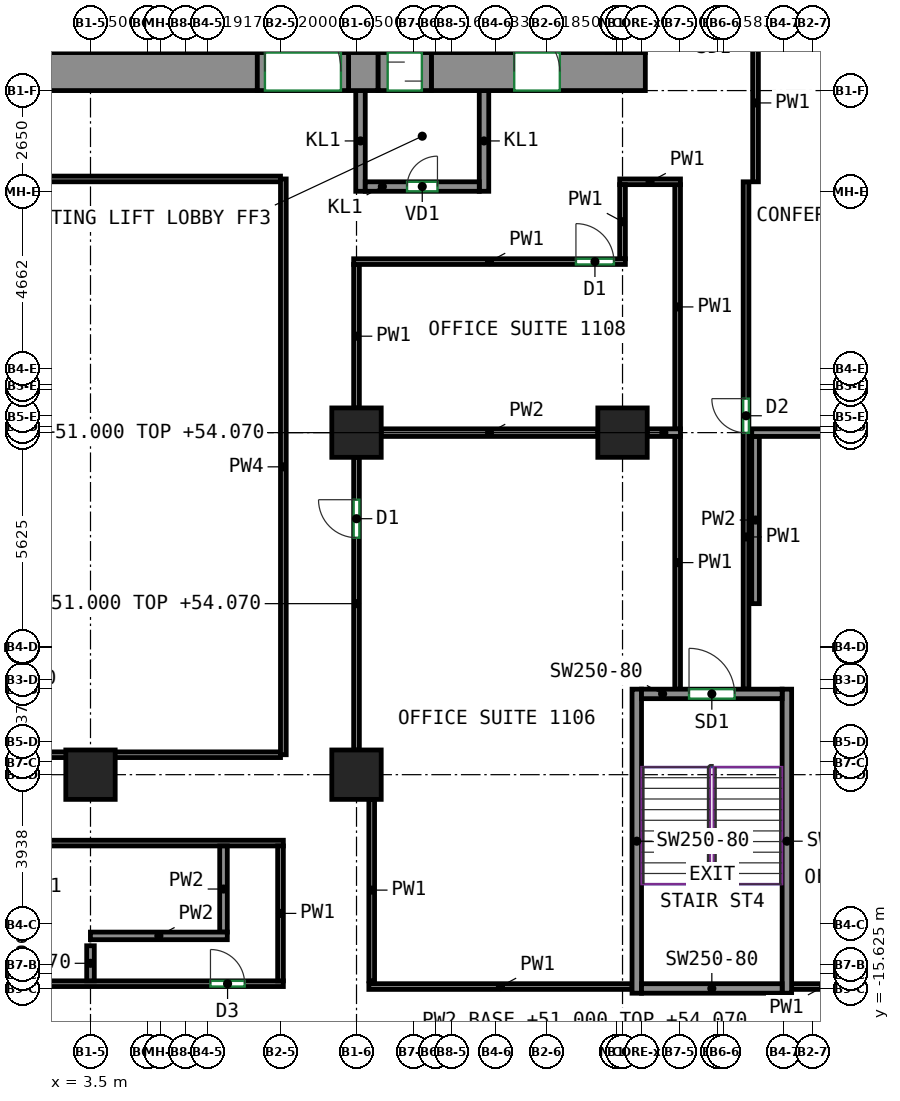
"""IFC4 building model, lengths in metres.
Left out: names, types, materials, properties, quantities, classifications, styles, units other than length and angle.
Written with IfcOpenShell. Run it as: python <this file> out.ifc"""

import sys

from ifc_helpers import new_model, si_unit, direction, frame, frame_2d, origin, origin_2d, place, context, subcontext, project, spatial, rectangle, extrude, source, transform, mapped, element, fill, save


model = new_model("IFC4")
c1 = context("Model", 3, precision=1e-05, world=origin(), true_north=direction((0.0, 1.0)))
c2 = subcontext(c1, "Body", "Model", "MODEL_VIEW")
j1 = project(units=[si_unit("LENGTHUNIT", "METRE"), si_unit("PLANEANGLEUNIT", "RADIAN")], contexts=[c1])
p1 = place(None, origin())
s1 = spatial("IfcSite", under=j1, at=p1, CompositionType="ELEMENT")
p2 = place(p1, origin())
s2 = spatial("IfcBuilding", under=s1, at=p2, CompositionType="ELEMENT")
p3 = place(p2, frame((0.0, 0.0, 51.0)))
s3 = spatial("IfcBuildingStorey", under=s2, at=p3, CompositionType="ELEMENT", Elevation=51.0)
m1 = source(origin(), c2, "Body", "SweptSolid", [
    extrude(rectangle(XDim=1.3, YDim=1.3, at=origin_2d()), origin(), (0.0, 0.0, 1.0), 3.72),
])
for number, where, z_axis, x_axis in (
    (1, (3.5, -10.0, 0.0), (0.0, 0.0, 1.0), (1.0, 0.0, 0.0)),
    (2, (10.5, -10.0, 0.0), (0.0, 0.0, 1.0), (1.0, 0.0, 0.0)),
    (3, (10.5, -1.0, 0.0), (0.0, 0.0, 1.0), (1.0, 0.0, 0.0)),
    (4, (17.5, -1.0, 0.0), (0.0, 0.0, 1.0), (1.0, 0.0, 0.0)),
):
    element("IfcColumn", number, at=place(p3, frame(where, z_axis=z_axis, x_axis=x_axis)), inside=s3, PredefinedType="COLUMN", context=c2, shape_type="MappedRepresentation", body=[
        mapped(m1, transform((0.0, 0.0, 0.0))),
    ])
m2 = source(origin(), c2, "Body", "SweptSolid", [
    extrude(rectangle(XDim=14.18, YDim=1.0, at=frame_2d((7.09, 0.0))), origin(), (0.0, 0.0, 1.0), 3.72),
])
p4 = place(p3, frame((-6.29, 8.5, 0.0), z_axis=(0.0, 0.0, 1.0), x_axis=(1.0, 0.0, 0.0)))
e5 = element("IfcWall", 5, at=p4, inside=s3, PredefinedType="SHEAR", context=c2, shape_type="MappedRepresentation", body=[
    mapped(m2, transform((0.0, 0.0, 0.0))),
])
m3 = source(origin(), c2, "Body", "SweptSolid", [
    extrude(rectangle(XDim=0.78, YDim=1.0, at=frame_2d((0.39, 0.0))), origin(), (0.0, 0.0, 1.0), 3.72),
])
p5 = place(p3, frame((10.29, 8.5, 0.0), z_axis=(0.0, 0.0, 1.0), x_axis=(1.0, 0.0, 0.0)))
e6 = element("IfcWall", 6, at=p5, inside=s3, PredefinedType="SHEAR", context=c2, shape_type="MappedRepresentation", body=[
    mapped(m3, transform((0.0, 0.0, 0.0))),
])
m4 = source(origin(), c2, "Body", "SweptSolid", [
    extrude(rectangle(XDim=5.63, YDim=1.0, at=frame_2d((2.815, 0.0))), origin(), (0.0, 0.0, 1.0), 3.72),
])
p6 = place(p3, frame((12.47, 8.5, 0.0), z_axis=(0.0, 0.0, 1.0), x_axis=(1.0, 0.0, 0.0)))
e7 = element("IfcWall", 7, at=p6, inside=s3, PredefinedType="SHEAR", context=c2, shape_type="MappedRepresentation", body=[
    mapped(m4, transform((0.0, 0.0, 0.0))),
])
p7 = place(p6, frame((2.18, 0.0, 0.0)))
e8 = element("IfcOpeningElement", 8, at=p7, cuts=e7, PredefinedType="OPENING", context=c2, shape_type="SweptSolid", body=[
    extrude(rectangle(XDim=1.2, YDim=2.1, at=frame_2d((0.6, 1.05))), frame((0.0, 0.51, 0.0), z_axis=(0.0, -1.0, 0.0), x_axis=(1.0, 0.0, 0.0)), (0.0, 0.0, 1.0), 1.02),
])
m5 = source(origin(), c2, "Body", "SweptSolid", [
    extrude(rectangle(XDim=8.0, YDim=0.25, at=frame_2d((4.0, 0.0))), origin(), (0.0, 0.0, 1.0), 3.72),
])
for number, where, z_axis, x_axis in (
    (9, (17.875, -15.75, 0.0), (0.0, 0.0, 1.0), (0.0, 1.0, 0.0)),
    (10, (21.825, -15.75, 0.0), (0.0, 0.0, 1.0), (0.0, 1.0, 0.0)),
):
    element("IfcWall", number, at=place(p3, frame(where, z_axis=z_axis, x_axis=x_axis)), inside=s3, PredefinedType="SHEAR", context=c2, shape_type="MappedRepresentation", body=[
        mapped(m5, transform((0.0, 0.0, 0.0))),
    ])
m6 = source(origin(), c2, "Body", "SweptSolid", [
    extrude(rectangle(XDim=3.7, YDim=0.25, at=frame_2d((1.85, 0.0))), origin(), (0.0, 0.0, 1.0), 3.72),
])
p8 = place(p3, frame((18.0, -15.625, 0.0), z_axis=(0.0, 0.0, 1.0), x_axis=(1.0, 0.0, 0.0)))
e11 = element("IfcWall", 11, at=p8, inside=s3, PredefinedType="SHEAR", context=c2, shape_type="MappedRepresentation", body=[
    mapped(m6, transform((0.0, 0.0, 0.0))),
])
p9 = place(p3, frame((18.0, -7.875, 0.0), z_axis=(0.0, 0.0, 1.0), x_axis=(1.0, 0.0, 0.0)))
e12 = element("IfcWall", 12, at=p9, inside=s3, PredefinedType="SHEAR", context=c2, shape_type="MappedRepresentation", body=[
    mapped(m6, transform((0.0, 0.0, 0.0))),
])
p10 = place(p9, frame((1.25, 0.0, 0.0)))
e13 = element("IfcOpeningElement", 13, at=p10, cuts=e12, PredefinedType="OPENING", context=c2, shape_type="SweptSolid", body=[
    extrude(rectangle(XDim=1.2, YDim=2.1, at=frame_2d((0.6, 1.05))), frame((0.0, 0.135, 0.0), z_axis=(0.0, -1.0, 0.0), x_axis=(1.0, 0.0, 0.0)), (0.0, 0.0, 1.0), 0.27),
])
m7 = source(origin(), c2, "Body", "SweptSolid", [
    extrude(rectangle(XDim=2.65, YDim=0.25, at=frame_2d((1.325, 0.0))), origin(), (0.0, 0.0, 1.0), 3.72),
])
for number, where, z_axis, x_axis in (
    (14, (10.605, 5.35, 0.0), (0.0, 0.0, 1.0), (0.0, 1.0, 0.0)),
    (15, (13.855, 5.35, 0.0), (0.0, 0.0, 1.0), (0.0, 1.0, 0.0)),
):
    element("IfcWall", number, at=place(p3, frame(where, z_axis=z_axis, x_axis=x_axis)), inside=s3, PredefinedType="PARTITIONING", context=c2, shape_type="MappedRepresentation", body=[
        mapped(m7, transform((0.0, 0.0, 0.0))),
    ])
m8 = source(origin(), c2, "Body", "SweptSolid", [
    extrude(rectangle(XDim=3.0, YDim=0.25, at=frame_2d((1.5, 0.0))), origin(), (0.0, 0.0, 1.0), 3.72),
])
p11 = place(p3, frame((10.73, 5.475, 0.0), z_axis=(0.0, 0.0, 1.0), x_axis=(1.0, 0.0, 0.0)))
e16 = element("IfcWall", 16, at=p11, inside=s3, PredefinedType="PARTITIONING", context=c2, shape_type="MappedRepresentation", body=[
    mapped(m8, transform((0.0, 0.0, 0.0))),
])
p12 = place(p11, frame((1.1, 0.0, 0.0)))
e17 = element("IfcOpeningElement", 17, at=p12, cuts=e16, PredefinedType="OPENING", context=c2, shape_type="SweptSolid", body=[
    extrude(rectangle(XDim=0.8, YDim=2.0, at=frame_2d((0.4, 1.0))), frame((0.0, 0.135, 0.0), z_axis=(0.0, -1.0, 0.0), x_axis=(1.0, 0.0, 0.0)), (0.0, 0.0, 1.0), 0.27),
])
m9 = source(origin(), c2, "Body", "SweptSolid", [
    extrude(rectangle(XDim=2.4, YDim=1.0, at=frame_2d((1.2, 0.0))), origin(), (0.0, 0.0, 1.0), 2.7),
])
p13 = place(p3, frame((7.89, 8.5, 0.0), z_axis=(0.0, 0.0, 1.0), x_axis=(1.0, 0.0, 0.0)))
e18 = element("IfcWall", 18, at=p13, inside=s3, PredefinedType="PARTITIONING", context=c2, shape_type="MappedRepresentation", body=[
    mapped(m9, transform((0.0, 0.0, 0.0))),
])
p14 = place(p13, frame((0.2, 0.0, 0.0)))
e19 = element("IfcOpeningElement", 19, at=p14, cuts=e18, PredefinedType="OPENING", context=c2, shape_type="SweptSolid", body=[
    extrude(rectangle(XDim=2.0, YDim=2.1, at=frame_2d((1.0, 1.05))), frame((0.0, 0.51, 0.0), z_axis=(0.0, -1.0, 0.0), x_axis=(1.0, 0.0, 0.0)), (0.0, 0.0, 1.0), 1.02),
])
m10 = source(origin(), c2, "Body", "SweptSolid", [
    extrude(rectangle(XDim=1.4, YDim=1.0, at=frame_2d((0.7, 0.0))), origin(), (0.0, 0.0, 1.0), 2.7),
])
p15 = place(p3, frame((11.07, 8.5, 0.0), z_axis=(0.0, 0.0, 1.0), x_axis=(1.0, 0.0, 0.0)))
e20 = element("IfcWall", 20, at=p15, inside=s3, PredefinedType="PARTITIONING", context=c2, shape_type="MappedRepresentation", body=[
    mapped(m10, transform((0.0, 0.0, 0.0))),
])
p16 = place(p15, frame((0.25, 0.0, 0.0)))
e21 = element("IfcOpeningElement", 21, at=p16, cuts=e20, PredefinedType="OPENING", context=c2, shape_type="SweptSolid", body=[
    extrude(rectangle(XDim=0.9, YDim=2.1, at=frame_2d((0.45, 1.05))), frame((0.0, 0.51, 0.0), z_axis=(0.0, -1.0, 0.0), x_axis=(1.0, 0.0, 0.0)), (0.0, 0.0, 1.0), 1.02),
])
p17 = place(p3, frame((-6.575, -11.8, 0.0), z_axis=(0.0, 0.0, 1.0), x_axis=(1.0, 0.0, 0.0)))
e22 = element("IfcWall", 22, at=p17, inside=s3, PredefinedType="PARTITIONING", context=c2, shape_type="SweptSolid", body=[
    extrude(rectangle(XDim=15.15, YDim=0.15, at=frame_2d((7.575, 0.0))), origin(), (0.0, 0.0, 1.0), 3.72),
])
p18 = place(p17, frame((1.308, 0.0, 0.0)))
e23 = element("IfcOpeningElement", 23, at=p18, cuts=e22, PredefinedType="OPENING", context=c2, shape_type="SweptSolid", body=[
    extrude(rectangle(XDim=0.9, YDim=2.1, at=frame_2d((0.45, 1.05))), frame((0.0, 0.085, 0.0), z_axis=(0.0, -1.0, 0.0), x_axis=(1.0, 0.0, 0.0)), (0.0, 0.0, 1.0), 0.17),
])
p19 = place(p3, frame((-6.575, -15.5, 0.0), z_axis=(0.0, 0.0, 1.0), x_axis=(1.0, 0.0, 0.0)))
e24 = element("IfcWall", 24, at=p19, inside=s3, PredefinedType="PARTITIONING", context=c2, shape_type="SweptSolid", body=[
    extrude(rectangle(XDim=15.15, YDim=0.15, at=frame_2d((7.575, 0.0))), origin(), (0.0, 0.0, 1.0), 3.72),
])
p20 = place(p19, frame((13.232, 0.0, 0.0)))
e25 = element("IfcOpeningElement", 25, at=p20, cuts=e24, PredefinedType="OPENING", context=c2, shape_type="SweptSolid", body=[
    extrude(rectangle(XDim=0.9, YDim=2.1, at=frame_2d((0.45, 1.05))), frame((0.0, 0.085, 0.0), z_axis=(0.0, -1.0, 0.0), x_axis=(1.0, 0.0, 0.0)), (0.0, 0.0, 1.0), 0.17),
])
p21 = place(p3, frame((8.5, -11.875, 0.0), z_axis=(0.0, 0.0, 1.0), x_axis=(0.0, -1.0, 0.0)))
e26 = element("IfcWall", 26, at=p21, inside=s3, PredefinedType="PARTITIONING", context=c2, shape_type="SweptSolid", body=[
    extrude(rectangle(XDim=3.55, YDim=0.15, at=frame_2d((1.775, 0.0))), origin(), (0.0, 0.0, 1.0), 3.72),
])
p22 = place(p3, frame((10.5, -9.35, 0.0), z_axis=(0.0, 0.0, 1.0), x_axis=(0.0, 1.0, 0.0)))
e27 = element("IfcWall", 27, at=p22, inside=s3, PredefinedType="PARTITIONING", context=c2, shape_type="SweptSolid", body=[
    extrude(rectangle(XDim=7.7, YDim=0.15, at=frame_2d((3.85, 0.0))), origin(), (0.0, 0.0, 1.0), 3.07),
])
p23 = place(p22, frame((5.585, 0.0, 0.0)))
e28 = element("IfcOpeningElement", 28, at=p23, cuts=e27, PredefinedType="OPENING", context=c2, shape_type="SweptSolid", body=[
    extrude(rectangle(XDim=1.0, YDim=2.1, at=frame_2d((0.5, 1.05))), frame((0.0, 0.085, 0.0), z_axis=(0.0, -1.0, 0.0), x_axis=(1.0, 0.0, 0.0)), (0.0, 0.0, 1.0), 0.17),
])
p24 = place(p3, frame((10.9, -15.425, 0.0), z_axis=(0.0, 0.0, 1.0), x_axis=(0.0, 1.0, 0.0)))
e29 = element("IfcWall", 29, at=p24, inside=s3, PredefinedType="PARTITIONING", context=c2, shape_type="SweptSolid", body=[
    extrude(rectangle(XDim=4.775, YDim=0.15, at=frame_2d((2.388, 0.0))), origin(), (0.0, 0.0, 1.0), 3.72),
])
p25 = place(p3, frame((10.825, -15.575, 0.0), z_axis=(0.0, 0.0, 1.0), x_axis=(1.0, 0.0, 0.0)))
e30 = element("IfcWall", 30, at=p25, inside=s3, PredefinedType="PARTITIONING", context=c2, shape_type="SweptSolid", body=[
    extrude(rectangle(XDim=6.925, YDim=0.15, at=frame_2d((3.462, 0.0))), origin(), (0.0, 0.0, 1.0), 3.72),
])
p26 = place(p3, frame((18.95, -7.75, 0.0), z_axis=(0.0, 0.0, 1.0), x_axis=(0.0, 1.0, 0.0)))
e31 = element("IfcWall", 31, at=p26, inside=s3, PredefinedType="PARTITIONING", context=c2, shape_type="SweptSolid", body=[
    extrude(rectangle(XDim=6.66, YDim=0.15, at=frame_2d((3.33, 0.0))), origin(), (0.0, 0.0, 1.0), 3.72),
])
p27 = place(p3, frame((21.95, -15.575, 0.0), z_axis=(0.0, 0.0, 1.0), x_axis=(1.0, 0.0, 0.0)))
e32 = element("IfcWall", 32, at=p27, inside=s3, PredefinedType="PARTITIONING", context=c2, shape_type="SweptSolid", body=[
    extrude(rectangle(XDim=2.807, YDim=0.15, at=frame_2d((1.404, 0.0))), origin(), (0.0, 0.0, 1.0), 3.72),
])
p28 = place(p27, frame((1.506, 0.0, 0.0)))
e33 = element("IfcOpeningElement", 33, at=p28, cuts=e32, PredefinedType="OPENING", context=c2, shape_type="SweptSolid", body=[
    extrude(rectangle(XDim=1.0, YDim=2.1, at=frame_2d((0.5, 1.05))), frame((0.0, 0.085, 0.0), z_axis=(0.0, -1.0, 0.0), x_axis=(1.0, 0.0, 0.0)), (0.0, 0.0, 1.0), 0.17),
])
p29 = place(p3, frame((20.75, -7.75, 0.0), z_axis=(0.0, 0.0, 1.0), x_axis=(0.0, 1.0, 0.0)))
e34 = element("IfcWall", 34, at=p29, inside=s3, PredefinedType="PARTITIONING", context=c2, shape_type="SweptSolid", body=[
    extrude(rectangle(XDim=13.35, YDim=0.15, at=frame_2d((6.675, 0.0))), origin(), (0.0, 0.0, 1.0), 3.72),
])
p30 = place(p29, frame((6.744, 0.0, 0.0)))
e35 = element("IfcOpeningElement", 35, at=p30, cuts=e34, PredefinedType="OPENING", context=c2, shape_type="SweptSolid", body=[
    extrude(rectangle(XDim=0.9, YDim=2.1, at=frame_2d((0.45, 1.05))), frame((0.0, 0.085, 0.0), z_axis=(0.0, -1.0, 0.0), x_axis=(1.0, 0.0, 0.0)), (0.0, 0.0, 1.0), 0.17),
])
p31 = place(p3, frame((10.5, -0.35, 0.0), z_axis=(0.0, 0.0, 1.0), x_axis=(0.0, 1.0, 0.0)))
e36 = element("IfcWall", 36, at=p31, inside=s3, PredefinedType="PARTITIONING", context=c2, shape_type="SweptSolid", body=[
    extrude(rectangle(XDim=3.775, YDim=0.15, at=frame_2d((1.888, 0.0))), origin(), (0.0, 0.0, 1.0), 3.72),
])
p32 = place(p3, frame((18.95, -0.91, 0.0), z_axis=(0.0, 0.0, 1.0), x_axis=(0.0, 1.0, 0.0)))
e37 = element("IfcWall", 37, at=p32, inside=s3, PredefinedType="PARTITIONING", context=c2, shape_type="SweptSolid", body=[
    extrude(rectangle(XDim=6.435, YDim=0.15, at=frame_2d((3.217, 0.0))), origin(), (0.0, 0.0, 1.0), 3.72),
])
p33 = place(p3, frame((17.425, 5.6, 0.0), z_axis=(0.0, 0.0, 1.0), x_axis=(1.0, 0.0, 0.0)))
e38 = element("IfcWall", 38, at=p33, inside=s3, PredefinedType="PARTITIONING", context=c2, shape_type="SweptSolid", body=[
    extrude(rectangle(XDim=1.6, YDim=0.15, at=frame_2d((0.8, 0.0))), origin(), (0.0, 0.0, 1.0), 3.72),
])
p34 = place(p3, frame((17.5, 3.575, 0.0), z_axis=(0.0, 0.0, 1.0), x_axis=(0.0, 1.0, 0.0)))
e39 = element("IfcWall", 39, at=p34, inside=s3, PredefinedType="PARTITIONING", context=c2, shape_type="SweptSolid", body=[
    extrude(rectangle(XDim=1.95, YDim=0.15, at=frame_2d((0.975, 0.0))), origin(), (0.0, 0.0, 1.0), 3.72),
])
p35 = place(p3, frame((10.425, 3.5, 0.0), z_axis=(0.0, 0.0, 1.0), x_axis=(1.0, 0.0, 0.0)))
e40 = element("IfcWall", 40, at=p35, inside=s3, PredefinedType="PARTITIONING", context=c2, shape_type="SweptSolid", body=[
    extrude(rectangle(XDim=7.15, YDim=0.15, at=frame_2d((3.575, 0.0))), origin(), (0.0, 0.0, 1.0), 3.72),
])
p36 = place(p35, frame((5.849, 0.0, 0.0)))
e41 = element("IfcOpeningElement", 41, at=p36, cuts=e40, PredefinedType="OPENING", context=c2, shape_type="SweptSolid", body=[
    extrude(rectangle(XDim=1.0, YDim=2.1, at=frame_2d((0.5, 1.05))), frame((0.0, 0.085, 0.0), z_axis=(0.0, -1.0, 0.0), x_axis=(1.0, 0.0, 0.0)), (0.0, 0.0, 1.0), 0.17),
])
p37 = place(p3, frame((21.0, 5.6, 0.0), z_axis=(0.0, 0.0, 1.0), x_axis=(0.0, 1.0, 0.0)))
e42 = element("IfcWall", 42, at=p37, inside=s3, PredefinedType="PARTITIONING", context=c2, shape_type="SweptSolid", body=[
    extrude(rectangle(XDim=4.15, YDim=0.15, at=frame_2d((2.075, 0.0))), origin(), (0.0, 0.0, 1.0), 3.72),
])
p38 = place(p3, frame((7.0, -14.142, 0.0), z_axis=(0.0, 0.0, 1.0), x_axis=(0.0, 1.0, 0.0)))
e43 = element("IfcWall", 43, at=p38, inside=s3, PredefinedType="PARTITIONING", context=c2, shape_type="SweptSolid", body=[
    extrude(rectangle(XDim=2.266, YDim=0.2, at=frame_2d((1.133, 0.0))), origin(), (0.0, 0.0, 1.0), 3.72),
])
p39 = place(p3, frame((3.498, -14.242, 0.0), z_axis=(0.0, 0.0, 1.0), x_axis=(1.0, 0.0, 0.0)))
e44 = element("IfcWall", 44, at=p39, inside=s3, PredefinedType="PARTITIONING", context=c2, shape_type="SweptSolid", body=[
    extrude(rectangle(XDim=3.602, YDim=0.2, at=frame_2d((1.801, 0.0))), origin(), (0.0, 0.0, 1.0), 3.72),
])
p40 = place(p3, frame((3.5, -15.424, 0.0), z_axis=(0.0, 0.0, 1.0), x_axis=(0.0, 1.0, 0.0)))
e45 = element("IfcWall", 45, at=p40, inside=s3, PredefinedType="PARTITIONING", context=c2, shape_type="SweptSolid", body=[
    extrude(rectangle(XDim=0.922, YDim=0.2, at=frame_2d((0.461, 0.0))), origin(), (0.0, 0.0, 1.0), 3.07),
])
p41 = place(p3, frame((11.15, -1.0, 0.0), z_axis=(0.0, 0.0, 1.0), x_axis=(1.0, 0.0, 0.0)))
e46 = element("IfcWall", 46, at=p41, inside=s3, PredefinedType="PARTITIONING", context=c2, shape_type="SweptSolid", body=[
    extrude(rectangle(XDim=5.7, YDim=0.2, at=frame_2d((2.85, 0.0))), origin(), (0.0, 0.0, 1.0), 3.72),
])
p42 = place(p3, frame((18.15, -1.0, 0.0), z_axis=(0.0, 0.0, 1.0), x_axis=(1.0, 0.0, 0.0)))
e47 = element("IfcWall", 47, at=p42, inside=s3, PredefinedType="PARTITIONING", context=c2, shape_type="SweptSolid", body=[
    extrude(rectangle(XDim=0.874, YDim=0.2, at=frame_2d((0.437, 0.0))), origin(), (0.0, 0.0, 1.0), 3.07),
])
p43 = place(p3, frame((21.0, -1.1, 0.0), z_axis=(0.0, 0.0, 1.0), x_axis=(0.0, -1.0, 0.0)))
e48 = element("IfcWall", 48, at=p43, inside=s3, PredefinedType="PARTITIONING", context=c2, shape_type="SweptSolid", body=[
    extrude(rectangle(XDim=4.4, YDim=0.2, at=frame_2d((2.2, 0.0))), origin(), (0.0, 0.0, 1.0), 3.72),
])
p44 = place(p3, frame((20.9, -1.0, 0.0), z_axis=(0.0, 0.0, 1.0), x_axis=(1.0, 0.0, 0.0)))
e49 = element("IfcWall", 49, at=p44, inside=s3, PredefinedType="PARTITIONING", context=c2, shape_type="SweptSolid", body=[
    extrude(rectangle(XDim=6.2, YDim=0.2, at=frame_2d((3.1, 0.0))), origin(), (0.0, 0.0, 1.0), 3.07),
])
for number, where, z_axis, x_axis in (
    (50, (8.5, -9.475, 0.0), (0.0, 0.0, 1.0), (-1.0, 0.0, 0.0)),
    (51, (-6.575, 5.675, 0.0), (0.0, 0.0, 1.0), (1.0, 0.0, 0.0)),
):
    element("IfcWall", number, at=place(p3, frame(where, z_axis=z_axis, x_axis=x_axis)), inside=s3, PredefinedType="PARTITIONING", context=c2, shape_type="SweptSolid", body=[
        extrude(rectangle(XDim=15.075, YDim=0.15, at=frame_2d((7.538, 0.0))), origin(), (0.0, 0.0, 1.0), 3.72),
    ])
p45 = place(p3, frame((8.575, 5.675, 0.0), z_axis=(0.0, 0.0, 1.0), x_axis=(0.0, -1.0, 0.0)))
e52 = element("IfcWall", 52, at=p45, inside=s3, PredefinedType="PARTITIONING", context=c2, shape_type="SweptSolid", body=[
    extrude(rectangle(XDim=15.15, YDim=0.15, at=frame_2d((7.575, 0.0))), origin(), (0.0, 0.0, 1.0), 3.72),
])
p46 = place(p14, origin())
e53 = element("IfcDoor", 53, at=p46, inside=s3, OperationType="DOUBLE_DOOR_SINGLE_SWING", PredefinedType="DOOR", context=c2, shape_type="SweptSolid", body=[
    extrude(rectangle(XDim=2.0, YDim=2.1, at=frame_2d((1.0, 1.05))), frame((0.0, 0.405, 0.0), z_axis=(0.0, -1.0, 0.0), x_axis=(1.0, 0.0, 0.0)), (0.0, 0.0, 1.0), 0.05),
])
fill(e19, e53)
p47 = place(p12, origin())
e54 = element("IfcDoor", 54, at=p47, inside=s3, OperationType="SINGLE_SWING_RIGHT", PredefinedType="DOOR", context=c2, shape_type="SweptSolid", body=[
    extrude(rectangle(XDim=0.8, YDim=2.0, at=frame_2d((0.4, 1.0))), frame((0.0, 0.025, 0.0), z_axis=(0.0, -1.0, 0.0), x_axis=(1.0, 0.0, 0.0)), (0.0, 0.0, 1.0), 0.05),
])
fill(e17, e54)
p48 = place(p16, origin())
e55 = element("IfcDoor", 55, at=p48, inside=s3, OperationType="SLIDING_TO_LEFT", PredefinedType="DOOR", context=c2, shape_type="SweptSolid", body=[
    extrude(rectangle(XDim=0.9, YDim=2.1, at=frame_2d((0.45, 1.05))), frame((0.0, 0.405, 0.0), z_axis=(0.0, -1.0, 0.0), x_axis=(1.0, 0.0, 0.0)), (0.0, 0.0, 1.0), 0.05),
])
fill(e21, e55)
p49 = place(p7, origin())
e56 = element("IfcDoor", 56, at=p49, inside=s3, OperationType="DOUBLE_DOOR_SINGLE_SWING", PredefinedType="DOOR", context=c2, shape_type="SweptSolid", body=[
    extrude(rectangle(XDim=1.2, YDim=2.1, at=frame_2d((0.6, 1.05))), frame((0.0, 0.405, 0.0), z_axis=(0.0, -1.0, 0.0), x_axis=(1.0, 0.0, 0.0)), (0.0, 0.0, 1.0), 0.05),
])
fill(e8, e56)
p50 = place(p10, origin())
e57 = element("IfcDoor", 57, at=p50, inside=s3, OperationType="DOUBLE_DOOR_SINGLE_SWING", PredefinedType="DOOR", context=c2, shape_type="SweptSolid", body=[
    extrude(rectangle(XDim=1.2, YDim=2.1, at=frame_2d((0.6, 1.05))), frame((0.0, 0.025, 0.0), z_axis=(0.0, -1.0, 0.0), x_axis=(1.0, 0.0, 0.0)), (0.0, 0.0, 1.0), 0.05),
])
fill(e13, e57)
p51 = place(p20, origin())
e58 = element("IfcDoor", 58, at=p51, inside=s3, OperationType="SINGLE_SWING_LEFT", PredefinedType="DOOR", context=c2, shape_type="SweptSolid", body=[
    extrude(rectangle(XDim=0.9, YDim=2.1, at=frame_2d((0.45, 1.05))), frame((0.0, 0.025, 0.0), z_axis=(0.0, -1.0, 0.0), x_axis=(1.0, 0.0, 0.0)), (0.0, 0.0, 1.0), 0.05),
])
fill(e25, e58)
p52 = place(p23, origin())
e59 = element("IfcDoor", 59, at=p52, inside=s3, OperationType="SINGLE_SWING_RIGHT", PredefinedType="DOOR", context=c2, shape_type="SweptSolid", body=[
    extrude(rectangle(XDim=1.0, YDim=2.1, at=frame_2d((0.5, 1.05))), frame((0.0, 0.025, 0.0), z_axis=(0.0, -1.0, 0.0), x_axis=(1.0, 0.0, 0.0)), (0.0, 0.0, 1.0), 0.05),
])
fill(e28, e59)
p53 = place(p30, origin())
e60 = element("IfcDoor", 60, at=p53, inside=s3, OperationType="SINGLE_SWING_RIGHT", PredefinedType="DOOR", context=c2, shape_type="SweptSolid", body=[
    extrude(rectangle(XDim=0.9, YDim=2.1, at=frame_2d((0.45, 1.05))), frame((0.0, 0.025, 0.0), z_axis=(0.0, -1.0, 0.0), x_axis=(1.0, 0.0, 0.0)), (0.0, 0.0, 1.0), 0.05),
])
fill(e35, e60)
p54 = place(p36, origin())
e61 = element("IfcDoor", 61, at=p54, inside=s3, OperationType="SINGLE_SWING_LEFT", PredefinedType="DOOR", context=c2, shape_type="SweptSolid", body=[
    extrude(rectangle(XDim=1.0, YDim=2.1, at=frame_2d((0.5, 1.05))), frame((0.0, 0.025, 0.0), z_axis=(0.0, -1.0, 0.0), x_axis=(1.0, 0.0, 0.0)), (0.0, 0.0, 1.0), 0.05),
])
fill(e41, e61)
save(model, sys.argv[1])
